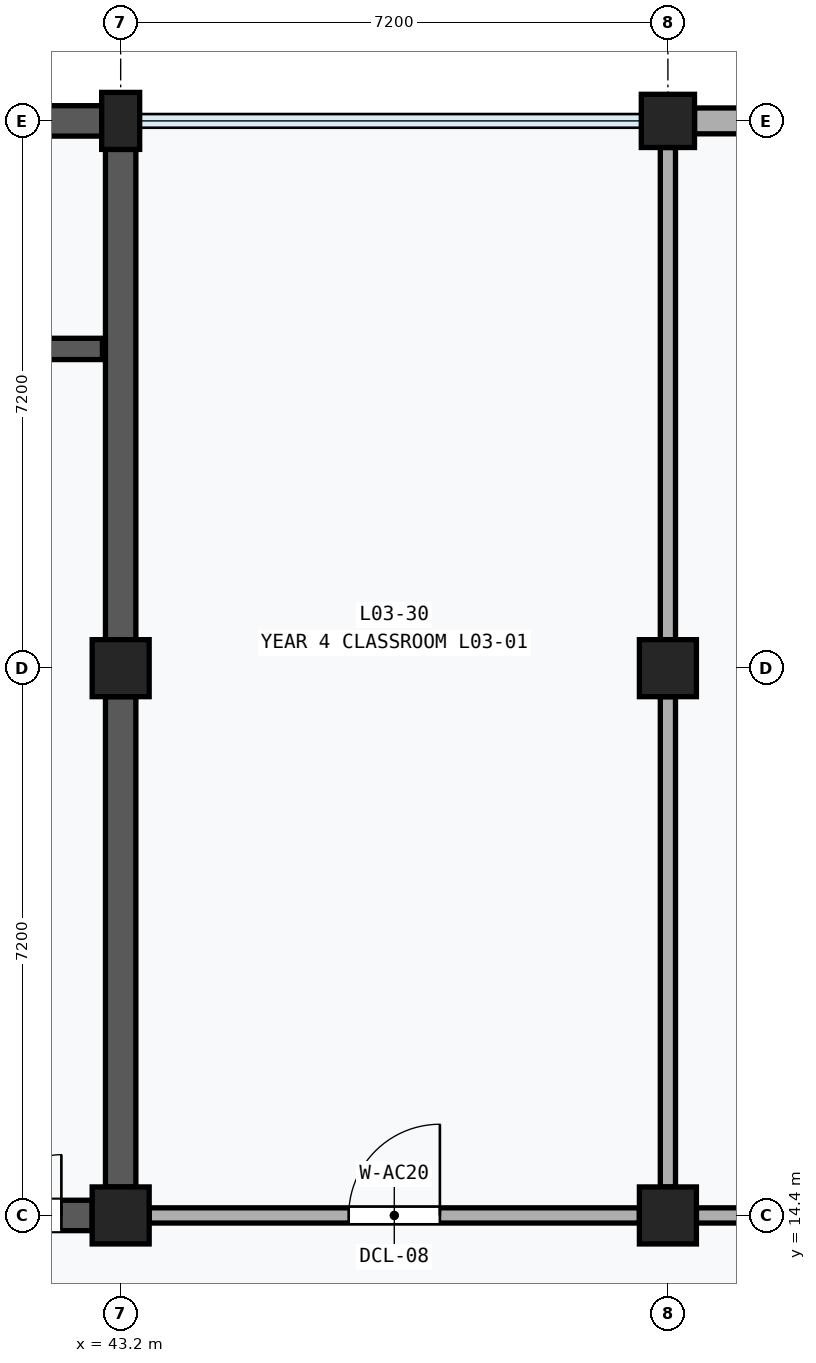
"""IFC4 building model, lengths in metres.
Left out: names, types, materials, properties, quantities, classifications, styles, units other than length and angle.
Written with IfcOpenShell. Run it as: python <this file> out.ifc"""

import sys

from ifc_helpers import new_model, si_unit, direction, frame, frame_2d, origin, origin_2d, place, context, subcontext, project, spatial, rectangle, extrude, element, fill, save


model = new_model("IFC4")
c1 = context("Model", 3, precision=1e-05, world=origin(), true_north=direction((0.0, 1.0)))
c2 = subcontext(c1, "Body", "Model", "MODEL_VIEW")
j1 = project(units=[si_unit("LENGTHUNIT", "METRE"), si_unit("PLANEANGLEUNIT", "RADIAN")], contexts=[c1])
p1 = place(None, origin())
s1 = spatial("IfcSite", under=j1, at=p1, CompositionType="ELEMENT")
p2 = place(p1, origin())
s2 = spatial("IfcBuilding", under=s1, at=p2, CompositionType="ELEMENT")
p3 = place(p2, frame((0.0, 0.0, 14.4)))
s3 = spatial("IfcBuildingStorey", under=s2, at=p3, CompositionType="ELEMENT", Elevation=14.4)
for number, where, z_axis, x_axis in (
    (1, (43.2, 14.4, 0.0), (0.0, 0.0, 1.0), (1.0, 0.0, 0.0)),
    (2, (43.2, 21.6, 0.0), (0.0, 0.0, 1.0), (1.0, 0.0, 0.0)),
):
    element("IfcColumn", number, at=place(p3, frame(where, z_axis=z_axis, x_axis=x_axis)), inside=s3, PredefinedType="COLUMN", context=c2, shape_type="SweptSolid", body=[
        extrude(rectangle(XDim=0.75, YDim=0.75, at=origin_2d()), origin(), (0.0, 0.0, 1.0), 4.2),
    ])
p4 = place(p3, frame((43.2, 28.8, 0.0), z_axis=(0.0, 0.0, 1.0), x_axis=(1.0, 0.0, 0.0)))
e3 = element("IfcColumn", 3, at=p4, inside=s3, PredefinedType="PILASTER", context=c2, shape_type="SweptSolid", body=[
    extrude(rectangle(XDim=0.5, YDim=0.75, at=origin_2d()), origin(), (0.0, 0.0, 1.0), 4.2),
])
for number, where, z_axis, x_axis in (
    (4, (50.4, 14.4, 0.0), (0.0, 0.0, 1.0), (1.0, 0.0, 0.0)),
    (5, (50.4, 21.6, 0.0), (0.0, 0.0, 1.0), (1.0, 0.0, 0.0)),
):
    element("IfcColumn", number, at=place(p3, frame(where, z_axis=z_axis, x_axis=x_axis)), inside=s3, PredefinedType="COLUMN", context=c2, shape_type="SweptSolid", body=[
        extrude(rectangle(XDim=0.75, YDim=0.75, at=origin_2d()), origin(), (0.0, 0.0, 1.0), 4.2),
    ])
p5 = place(p3, frame((50.4, 28.8, 0.0), z_axis=(0.0, 0.0, 1.0), x_axis=(1.0, 0.0, 0.0)))
e6 = element("IfcColumn", 6, at=p5, inside=s3, PredefinedType="COLUMN", context=c2, shape_type="SweptSolid", body=[
    extrude(rectangle(XDim=0.7, YDim=0.7, at=origin_2d()), origin(), (0.0, 0.0, 1.0), 4.2),
])
p6 = place(p3, frame((50.75, 28.8, 0.0), z_axis=(0.0, 0.0, 1.0), x_axis=(1.0, 0.0, 0.0)))
e7 = element("IfcWall", 7, at=p6, inside=s3, PredefinedType="SOLIDWALL", context=c2, shape_type="SweptSolid", body=[
    extrude(rectangle(XDim=6.5, YDim=0.34, at=frame_2d((3.25, 0.0))), origin(), (0.0, 0.0, 1.0), 3.31),
])
p7 = place(p6, frame((1.85, 0.0, 0.7)))
e8 = element("IfcOpeningElement", 8, at=p7, cuts=e7, PredefinedType="OPENING", context=c2, shape_type="SweptSolid", body=[
    extrude(rectangle(XDim=2.8, YDim=2.2, at=frame_2d((1.4, 1.1))), frame((0.0, 0.182, 0.0), z_axis=(0.0, -1.0, 0.0), x_axis=(1.0, 0.0, 0.0)), (0.0, 0.0, 1.0), 0.364),
])
p8 = place(p3, frame((43.2, 14.775, 0.0), z_axis=(0.0, 0.0, 1.0), x_axis=(0.0, 1.0, 0.0)))
e9 = element("IfcWall", 9, at=p8, inside=s3, PredefinedType="SHEAR", context=c2, shape_type="SweptSolid", body=[
    extrude(rectangle(XDim=6.45, YDim=0.4, at=frame_2d((3.225, 0.0))), origin(), (0.0, 0.0, 1.0), 3.17),
])
p9 = place(p3, frame((43.2, 21.975, 0.0), z_axis=(0.0, 0.0, 1.0), x_axis=(0.0, 1.0, 0.0)))
e10 = element("IfcWall", 10, at=p9, inside=s3, PredefinedType="SHEAR", context=c2, shape_type="SweptSolid", body=[
    extrude(rectangle(XDim=6.45, YDim=0.4, at=frame_2d((3.225, 0.0))), origin(), (0.0, 0.0, 1.0), 3.17),
])
p10 = place(p3, frame((36.375, 14.4, 0.0), z_axis=(0.0, 0.0, 1.0), x_axis=(1.0, 0.0, 0.0)))
e11 = element("IfcWall", 11, at=p10, inside=s3, PredefinedType="SHEAR", context=c2, shape_type="SweptSolid", body=[
    extrude(rectangle(XDim=6.45, YDim=0.4, at=frame_2d((3.225, 0.0))), origin(), (0.0, 0.0, 1.0), 3.17),
])
p11 = place(p10, frame((4.445, 0.0, 0.0)))
e12 = element("IfcOpeningElement", 12, at=p11, cuts=e11, PredefinedType="OPENING", context=c2, shape_type="SweptSolid", body=[
    extrude(rectangle(XDim=1.6, YDim=2.2, at=frame_2d((0.8, 1.1))), frame((0.0, 0.212, 0.0), z_axis=(0.0, -1.0, 0.0), x_axis=(1.0, 0.0, 0.0)), (0.0, 0.0, 1.0), 0.424),
])
p12 = place(p3, frame((36.35, 28.8, 0.0), z_axis=(0.0, 0.0, 1.0), x_axis=(1.0, 0.0, 0.0)))
e13 = element("IfcWall", 13, at=p12, inside=s3, PredefinedType="SHEAR", context=c2, shape_type="SweptSolid", body=[
    extrude(rectangle(XDim=6.6, YDim=0.4, at=frame_2d((3.3, 0.0))), origin(), (0.0, 0.0, 1.0), 3.31),
])
p13 = place(p3, frame((40.28, 25.8, 0.0), z_axis=(0.0, 0.0, 1.0), x_axis=(1.0, 0.0, 0.0)))
e14 = element("IfcWall", 14, at=p13, inside=s3, PredefinedType="SHEAR", context=c2, shape_type="SweptSolid", body=[
    extrude(rectangle(XDim=2.68, YDim=0.28, at=frame_2d((1.34, 0.0))), origin(), (0.0, 0.0, 1.0), 3.94),
])
p14 = place(p13, frame((0.65, 0.0, 0.0)))
e15 = element("IfcOpeningElement", 15, at=p14, cuts=e14, PredefinedType="OPENING", context=c2, shape_type="SweptSolid", body=[
    extrude(rectangle(XDim=1.0, YDim=2.15, at=frame_2d((0.5, 1.075))), frame((0.0, 0.152, 0.0), z_axis=(0.0, -1.0, 0.0), x_axis=(1.0, 0.0, 0.0)), (0.0, 0.0, 1.0), 0.304),
])
p15 = place(p3, frame((43.575, 14.4, 0.0), z_axis=(0.0, 0.0, 1.0), x_axis=(1.0, 0.0, 0.0)))
e16 = element("IfcWall", 16, at=p15, inside=s3, PredefinedType="PARTITIONING", context=c2, shape_type="SweptSolid", body=[
    extrude(rectangle(XDim=6.45, YDim=0.2, at=frame_2d((3.225, 0.0))), origin(), (0.0, 0.0, 1.0), 3.24),
])
p16 = place(p15, frame((2.625, 0.0, 0.0)))
e17 = element("IfcOpeningElement", 17, at=p16, cuts=e16, PredefinedType="OPENING", context=c2, shape_type="SweptSolid", body=[
    extrude(rectangle(XDim=1.2, YDim=2.24, at=frame_2d((0.6, 1.12))), frame((0.0, 0.112, 0.0), z_axis=(0.0, -1.0, 0.0), x_axis=(1.0, 0.0, 0.0)), (0.0, 0.0, 1.0), 0.224),
])
p17 = place(p3, frame((50.4, 14.775, 0.0), z_axis=(0.0, 0.0, 1.0), x_axis=(0.0, 1.0, 0.0)))
e18 = element("IfcWall", 18, at=p17, inside=s3, PredefinedType="PARTITIONING", context=c2, shape_type="SweptSolid", body=[
    extrude(rectangle(XDim=6.45, YDim=0.2, at=frame_2d((3.225, 0.0))), origin(), (0.0, 0.0, 1.0), 3.17),
])
p18 = place(p3, frame((50.4, 21.975, 0.0), z_axis=(0.0, 0.0, 1.0), x_axis=(0.0, 1.0, 0.0)))
e19 = element("IfcWall", 19, at=p18, inside=s3, PredefinedType="PARTITIONING", context=c2, shape_type="SweptSolid", body=[
    extrude(rectangle(XDim=6.475, YDim=0.2, at=frame_2d((3.237, 0.0))), origin(), (0.0, 0.0, 1.0), 3.17),
])
p19 = place(p3, frame((50.775, 14.4, 0.0), z_axis=(0.0, 0.0, 1.0), x_axis=(1.0, 0.0, 0.0)))
e20 = element("IfcWall", 20, at=p19, inside=s3, PredefinedType="PARTITIONING", context=c2, shape_type="SweptSolid", body=[
    extrude(rectangle(XDim=6.45, YDim=0.2, at=frame_2d((3.225, 0.0))), origin(), (0.0, 0.0, 1.0), 3.17),
])
p20 = place(p19, frame((2.605, 0.0, 0.0)))
e21 = element("IfcOpeningElement", 21, at=p20, cuts=e20, PredefinedType="OPENING", context=c2, shape_type="SweptSolid", body=[
    extrude(rectangle(XDim=1.24, YDim=2.26, at=frame_2d((0.62, 1.13))), frame((0.0, 0.112, 0.0), z_axis=(0.0, -1.0, 0.0), x_axis=(1.0, 0.0, 0.0)), (0.0, 0.0, 1.0), 0.224),
])
p21 = place(p11, origin())
e22 = element("IfcDoor", 22, at=p21, inside=s3, OperationType="DOUBLE_DOOR_SINGLE_SWING", PredefinedType="DOOR", context=c2, shape_type="SweptSolid", body=[
    extrude(rectangle(XDim=1.6, YDim=2.2, at=frame_2d((0.8, 1.1))), frame((0.0, 0.025, 0.0), z_axis=(0.0, -1.0, 0.0), x_axis=(1.0, 0.0, 0.0)), (0.0, 0.0, 1.0), 0.05),
])
fill(e12, e22)
p22 = place(p16, origin())
e23 = element("IfcDoor", 23, at=p22, inside=s3, OperationType="SINGLE_SWING_RIGHT", PredefinedType="DOOR", context=c2, shape_type="SweptSolid", body=[
    extrude(rectangle(XDim=1.2, YDim=2.24, at=frame_2d((0.6, 1.12))), frame((0.0, 0.025, 0.0), z_axis=(0.0, -1.0, 0.0), x_axis=(1.0, 0.0, 0.0)), (0.0, 0.0, 1.0), 0.05),
])
fill(e17, e23)
save(model, sys.argv[1])
